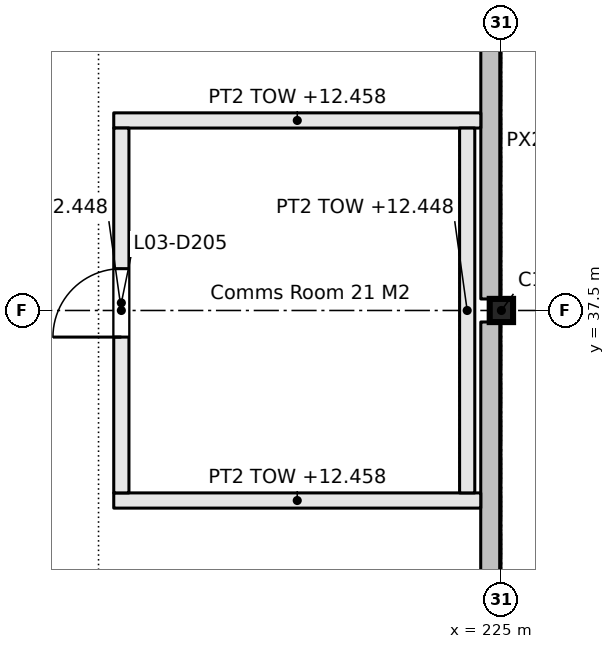
"""IFC4 building model, lengths in metres.
Left out: names, types, materials, properties, quantities, classifications, styles, units other than length and angle.
Written with IfcOpenShell. Run it as: python <this file> out.ifc"""

import sys

from ifc_helpers import new_model, si_unit, direction, frame, frame_2d, origin, origin_2d, place, context, subcontext, project, spatial, rectangle, i_section, extrude, element, fill, save


model = new_model("IFC4")
c1 = context("Model", 3, precision=1e-05, world=origin(), true_north=direction((0.0, 1.0)))
c2 = subcontext(c1, "Body", "Model", "MODEL_VIEW")
j1 = project(units=[si_unit("LENGTHUNIT", "METRE"), si_unit("PLANEANGLEUNIT", "RADIAN")], contexts=[c1])
p1 = place(None, origin())
s1 = spatial("IfcSite", under=j1, at=p1, CompositionType="ELEMENT")
p2 = place(p1, origin())
s2 = spatial("IfcBuilding", under=s1, at=p2, CompositionType="ELEMENT")
p3 = place(p2, frame((0.0, 0.0, 9.9)))
s3 = spatial("IfcBuildingStorey", under=s2, at=p3, CompositionType="ELEMENT", Elevation=9.9)
p4 = place(p3, frame((225.0, 37.5, 0.0), z_axis=(0.0, 0.0, 1.0), x_axis=(0.0, 1.0, 0.0)))
e1 = element("IfcColumn", 1, at=p4, inside=s3, PredefinedType="COLUMN", context=c2, shape_type="SweptSolid", body=[
    extrude(i_section(OverallWidth=0.305, OverallDepth=0.307, WebThickness=0.01, FlangeThickness=0.015, FilletRadius=0.015, at=origin_2d()), origin(), (0.0, 0.0, 1.0), 3.3),
])
p5 = place(p3, frame((219.9, 35.0, 0.0), z_axis=(0.0, 0.0, 1.0), x_axis=(1.0, 0.0, 0.0)))
e2 = element("IfcWall", 2, at=p5, inside=s3, PredefinedType="PARTITIONING", context=c2, shape_type="SweptSolid", body=[
    extrude(rectangle(XDim=4.828, YDim=0.2, at=frame_2d((2.414, 0.0))), origin(), (0.0, 0.0, 1.0), 2.558),
])
p6 = place(p3, frame((219.9, 40.0, 0.0), z_axis=(0.0, 0.0, 1.0), x_axis=(1.0, 0.0, 0.0)))
e3 = element("IfcWall", 3, at=p6, inside=s3, PredefinedType="PARTITIONING", context=c2, shape_type="SweptSolid", body=[
    extrude(rectangle(XDim=4.829, YDim=0.2, at=frame_2d((2.415, 0.0))), origin(), (0.0, 0.0, 1.0), 2.558),
])
p7 = place(p3, frame((220.0, 35.1, 0.0), z_axis=(0.0, 0.0, 1.0), x_axis=(0.0, 1.0, 0.0)))
e4 = element("IfcWall", 4, at=p7, inside=s3, PredefinedType="PARTITIONING", context=c2, shape_type="SweptSolid", body=[
    extrude(rectangle(XDim=4.8, YDim=0.2, at=frame_2d((2.4, 0.0))), origin(), (0.0, 0.0, 1.0), 2.548),
])
p8 = place(p7, frame((2.05, 0.0, 0.0)))
e5 = element("IfcOpeningElement", 5, at=p8, cuts=e4, PredefinedType="OPENING", context=c2, shape_type="SweptSolid", body=[
    extrude(rectangle(XDim=0.9, YDim=2.1, at=frame_2d((0.45, 1.05))), frame((0.0, 0.11, 0.0), z_axis=(0.0, -1.0, 0.0), x_axis=(1.0, 0.0, 0.0)), (0.0, 0.0, 1.0), 0.22),
])
p9 = place(p3, frame((224.55, 35.1, 0.0), z_axis=(0.0, 0.0, 1.0), x_axis=(0.0, 1.0, 0.0)))
e6 = element("IfcWall", 6, at=p9, inside=s3, PredefinedType="PARTITIONING", context=c2, shape_type="SweptSolid", body=[
    extrude(rectangle(XDim=4.8, YDim=0.2, at=frame_2d((2.4, 0.0))), origin(), (0.0, 0.0, 1.0), 2.548),
])
p10 = place(p3, frame((224.851, 30.153, 0.0), z_axis=(0.0, 0.0, 1.0), x_axis=(0.000407138461, 0.999999917119, 0.0)))
e7 = element("IfcWall", 7, at=p10, inside=s3, PredefinedType="SOLIDWALL", context=c2, shape_type="SweptSolid", body=[
    extrude(rectangle(XDim=7.196, YDim=0.25, at=frame_2d((3.598, 0.0))), origin(), (0.0, 0.0, 1.0), 1.1),
])
p11 = place(p3, frame((224.854, 37.652, 0.0), z_axis=(0.0, 0.0, 1.0), x_axis=(0.0, 1.0, 0.0)))
e8 = element("IfcWall", 8, at=p11, inside=s3, PredefinedType="SOLIDWALL", context=c2, shape_type="SweptSolid", body=[
    extrude(rectangle(XDim=7.197, YDim=0.25, at=frame_2d((3.598, 0.0))), origin(), (0.0, 0.0, 1.0), 1.1),
])
p12 = place(p8, origin())
e9 = element("IfcDoor", 9, at=p12, inside=s3, OperationType="SINGLE_SWING_RIGHT", PredefinedType="DOOR", context=c2, shape_type="SweptSolid", body=[
    extrude(rectangle(XDim=0.9, YDim=2.1, at=frame_2d((0.45, 1.05))), frame((0.0, 0.025, 0.0), z_axis=(0.0, -1.0, 0.0), x_axis=(1.0, 0.0, 0.0)), (0.0, 0.0, 1.0), 0.05),
])
fill(e5, e9)
save(model, sys.argv[1])
